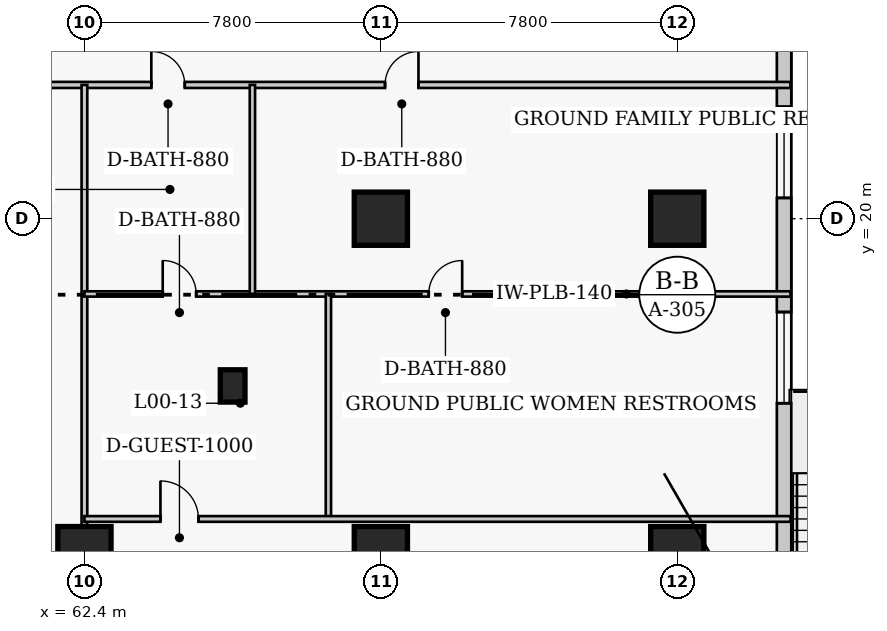
"""IFC4 building model, lengths in metres.
Left out: names, types, materials, properties, quantities, classifications, styles, units other than length and angle.
Written with IfcOpenShell. Run it as: python <this file> out.ifc"""

import sys

from ifc_helpers import new_model, si_unit, direction, frame, frame_2d, origin, origin_2d, place, context, subcontext, project, spatial, rectangle, extrude, element, fill, save


model = new_model("IFC4")
c1 = context("Model", 3, precision=1e-05, world=origin(), true_north=direction((0.0, 1.0)))
c2 = subcontext(c1, "Body", "Model", "MODEL_VIEW")
j1 = project(units=[si_unit("LENGTHUNIT", "METRE"), si_unit("PLANEANGLEUNIT", "RADIAN")], contexts=[c1])
p1 = place(None, origin())
s1 = spatial("IfcSite", under=j1, at=p1, CompositionType="ELEMENT")
p2 = place(p1, origin())
s2 = spatial("IfcBuilding", under=s1, at=p2, CompositionType="ELEMENT")
p3 = place(p2, origin())
s3 = spatial("IfcBuildingStorey", under=s2, at=p3, CompositionType="ELEMENT", Elevation=0.0)
for number, where, z_axis, x_axis in (
    (1, (62.4, 11.2, 0.0), (0.0, 0.0, 1.0), (1.0, 0.0, 0.0)),
    (2, (70.2, 11.2, 0.0), (0.0, 0.0, 1.0), (1.0, 0.0, 0.0)),
    (3, (70.2, 20.0, 0.0), (0.0, 0.0, 1.0), (1.0, 0.0, 0.0)),
    (4, (78.0, 11.2, 0.0), (0.0, 0.0, 1.0), (1.0, 0.0, 0.0)),
    (5, (78.0, 20.0, 0.0), (0.0, 0.0, 1.0), (1.0, 0.0, 0.0)),
):
    element("IfcColumn", number, at=place(p3, frame(where, z_axis=z_axis, x_axis=x_axis)), inside=s3, PredefinedType="COLUMN", context=c2, shape_type="SweptSolid", body=[
        extrude(rectangle(XDim=1.4, YDim=1.4, at=origin_2d()), origin(), (0.0, 0.0, 1.0), 5.4),
    ])
p4 = place(p3, frame((66.3, 15.6, 0.0), z_axis=(0.0, 0.0, 1.0), x_axis=(1.0, 0.0, 0.0)))
e6 = element("IfcColumn", 6, at=p4, inside=s3, PredefinedType="PILASTER", context=c2, shape_type="SweptSolid", body=[
    extrude(rectangle(XDim=0.65, YDim=0.85, at=origin_2d()), origin(), (0.0, 0.0, 1.0), 5.4),
])
p5 = place(p3, frame((80.81, 49.39, 0.0), z_axis=(0.0, 0.0, 1.0), x_axis=(0.0, -1.0, 0.0)))
e7 = element("IfcWall", 7, at=p5, inside=s3, PredefinedType="SOLIDWALL", context=c2, shape_type="SweptSolid", body=[
    extrude(rectangle(XDim=46.78, YDim=0.38, at=frame_2d((23.39, 0.0))), origin(), (0.0, 0.0, 1.0), 5.1),
])
p6 = place(p5, frame((15.29, 0.0, 0.0)))
e8 = element("IfcOpeningElement", 8, at=p6, cuts=e7, PredefinedType="OPENING", context=c2, shape_type="SweptSolid", body=[
    extrude(rectangle(XDim=3.2, YDim=2.6, at=frame_2d((1.6, 1.3))), frame((0.0, 0.2, 0.0), z_axis=(0.0, -1.0, 0.0), x_axis=(1.0, 0.0, 0.0)), (0.0, 0.0, 1.0), 0.4),
])
p7 = place(p5, frame((9.99, 0.0, 0.0)))
e9 = element("IfcOpeningElement", 9, at=p7, cuts=e7, PredefinedType="OPENING", context=c2, shape_type="SweptSolid", body=[
    extrude(rectangle(XDim=3.2, YDim=2.6, at=frame_2d((1.6, 1.3))), frame((0.0, 0.2, 0.0), z_axis=(0.0, -1.0, 0.0), x_axis=(1.0, 0.0, 0.0)), (0.0, 0.0, 1.0), 0.4),
])
p8 = place(p5, frame((4.99, 0.0, 0.0)))
e10 = element("IfcOpeningElement", 10, at=p8, cuts=e7, PredefinedType="OPENING", context=c2, shape_type="SweptSolid", body=[
    extrude(rectangle(XDim=3.2, YDim=2.6, at=frame_2d((1.6, 1.3))), frame((0.0, 0.2, 0.0), z_axis=(0.0, -1.0, 0.0), x_axis=(1.0, 0.0, 0.0)), (0.0, 0.0, 1.0), 0.4),
])
p9 = place(p5, frame((0.79, 0.0, 0.0)))
e11 = element("IfcOpeningElement", 11, at=p9, cuts=e7, PredefinedType="OPENING", context=c2, shape_type="SweptSolid", body=[
    extrude(rectangle(XDim=3.2, YDim=2.6, at=frame_2d((1.6, 1.3))), frame((0.0, 0.2, 0.0), z_axis=(0.0, -1.0, 0.0), x_axis=(1.0, 0.0, 0.0)), (0.0, 0.0, 1.0), 0.4),
])
p10 = place(p5, frame((19.087, 0.0, 0.75)))
e12 = element("IfcOpeningElement", 12, at=p10, cuts=e7, PredefinedType="OPENING", context=c2, shape_type="SweptSolid", body=[
    extrude(rectangle(XDim=2.4, YDim=2.2, at=frame_2d((1.2, 1.1))), frame((0.0, 0.2, 0.0), z_axis=(0.0, -1.0, 0.0), x_axis=(1.0, 0.0, 0.0)), (0.0, 0.0, 1.0), 0.4),
])
p11 = place(p5, frame((26.443, 0.0, 0.75)))
e13 = element("IfcOpeningElement", 13, at=p11, cuts=e7, PredefinedType="OPENING", context=c2, shape_type="SweptSolid", body=[
    extrude(rectangle(XDim=2.4, YDim=2.2, at=frame_2d((1.2, 1.1))), frame((0.0, 0.2, 0.0), z_axis=(0.0, -1.0, 0.0), x_axis=(1.0, 0.0, 0.0)), (0.0, 0.0, 1.0), 0.4),
])
p12 = place(p5, frame((31.845, 0.0, 0.75)))
e14 = element("IfcOpeningElement", 14, at=p12, cuts=e7, PredefinedType="OPENING", context=c2, shape_type="SweptSolid", body=[
    extrude(rectangle(XDim=2.4, YDim=2.2, at=frame_2d((1.2, 1.1))), frame((0.0, 0.2, 0.0), z_axis=(0.0, -1.0, 0.0), x_axis=(1.0, 0.0, 0.0)), (0.0, 0.0, 1.0), 0.4),
])
p13 = place(p5, frame((39.201, 0.0, 0.75)))
e15 = element("IfcOpeningElement", 15, at=p13, cuts=e7, PredefinedType="OPENING", context=c2, shape_type="SweptSolid", body=[
    extrude(rectangle(XDim=2.4, YDim=2.2, at=frame_2d((1.2, 1.1))), frame((0.0, 0.2, 0.0), z_axis=(0.0, -1.0, 0.0), x_axis=(1.0, 0.0, 0.0)), (0.0, 0.0, 1.0), 0.4),
])
p14 = place(p5, frame((43.454, 0.0, 0.75)))
e16 = element("IfcOpeningElement", 16, at=p14, cuts=e7, PredefinedType="OPENING", context=c2, shape_type="SweptSolid", body=[
    extrude(rectangle(XDim=2.4, YDim=2.2, at=frame_2d((1.2, 1.1))), frame((0.0, 0.2, 0.0), z_axis=(0.0, -1.0, 0.0), x_axis=(1.0, 0.0, 0.0)), (0.0, 0.0, 1.0), 0.4),
])
p15 = place(p3, frame((-2.98, 23.52, 0.0), z_axis=(0.0, 0.0, 1.0), x_axis=(1.0, 0.0, 0.0)))
e17 = element("IfcWall", 17, at=p15, inside=s3, PredefinedType="PARTITIONING", context=c2, shape_type="SweptSolid", body=[
    extrude(rectangle(XDim=83.96, YDim=0.16, at=frame_2d((41.98, 0.0))), origin(), (0.0, 0.0, 1.0), 5.1),
])
p16 = place(p15, frame((11.96, 0.0, 0.0)))
e18 = element("IfcOpeningElement", 18, at=p16, cuts=e17, PredefinedType="OPENING", context=c2, shape_type="SweptSolid", body=[
    extrude(rectangle(XDim=1.1, YDim=2.15, at=frame_2d((0.55, 1.075))), frame((0.0, 0.09, 0.0), z_axis=(0.0, -1.0, 0.0), x_axis=(1.0, 0.0, 0.0)), (0.0, 0.0, 1.0), 0.18),
])
p17 = place(p15, frame((6.73, 0.0, 0.0)))
e19 = element("IfcOpeningElement", 19, at=p17, cuts=e17, PredefinedType="OPENING", context=c2, shape_type="SweptSolid", body=[
    extrude(rectangle(XDim=1.8, YDim=2.2, at=frame_2d((0.9, 1.1))), frame((0.0, 0.09, 0.0), z_axis=(0.0, -1.0, 0.0), x_axis=(1.0, 0.0, 0.0)), (0.0, 0.0, 1.0), 0.18),
])
p18 = place(p15, frame((24.38, 0.0, 0.0)))
e20 = element("IfcOpeningElement", 20, at=p18, cuts=e17, PredefinedType="OPENING", context=c2, shape_type="SweptSolid", body=[
    extrude(rectangle(XDim=2.2, YDim=2.4, at=frame_2d((1.1, 1.2))), frame((0.0, 0.09, 0.0), z_axis=(0.0, -1.0, 0.0), x_axis=(1.0, 0.0, 0.0)), (0.0, 0.0, 1.0), 0.18),
])
p19 = place(p15, frame((40.88, 0.0, 0.0)))
e21 = element("IfcOpeningElement", 21, at=p19, cuts=e17, PredefinedType="OPENING", context=c2, shape_type="SweptSolid", body=[
    extrude(rectangle(XDim=2.2, YDim=2.4, at=frame_2d((1.1, 1.2))), frame((0.0, 0.09, 0.0), z_axis=(0.0, -1.0, 0.0), x_axis=(1.0, 0.0, 0.0)), (0.0, 0.0, 1.0), 0.18),
])
p20 = place(p15, frame((56.63, 0.0, 0.0)))
e22 = element("IfcOpeningElement", 22, at=p20, cuts=e17, PredefinedType="OPENING", context=c2, shape_type="SweptSolid", body=[
    extrude(rectangle(XDim=2.2, YDim=2.4, at=frame_2d((1.1, 1.2))), frame((0.0, 0.09, 0.0), z_axis=(0.0, -1.0, 0.0), x_axis=(1.0, 0.0, 0.0)), (0.0, 0.0, 1.0), 0.18),
])
p21 = place(p15, frame((67.14, 0.0, 0.0)))
e23 = element("IfcOpeningElement", 23, at=p21, cuts=e17, PredefinedType="OPENING", context=c2, shape_type="SweptSolid", body=[
    extrude(rectangle(XDim=0.88, YDim=2.05, at=frame_2d((0.44, 1.025))), frame((0.0, 0.09, 0.0), z_axis=(0.0, -1.0, 0.0), x_axis=(1.0, 0.0, 0.0)), (0.0, 0.0, 1.0), 0.18),
])
p22 = place(p15, frame((73.29, 0.0, 0.0)))
e24 = element("IfcOpeningElement", 24, at=p22, cuts=e17, PredefinedType="OPENING", context=c2, shape_type="SweptSolid", body=[
    extrude(rectangle(XDim=0.88, YDim=2.05, at=frame_2d((0.44, 1.025))), frame((0.0, 0.09, 0.0), z_axis=(0.0, -1.0, 0.0), x_axis=(1.0, 0.0, 0.0)), (0.0, 0.0, 1.0), 0.18),
])
p23 = place(p3, frame((62.4, 0.42, 0.0), z_axis=(0.0, 0.0, 1.0), x_axis=(0.0, 1.0, 0.0)))
e25 = element("IfcWall", 25, at=p23, inside=s3, PredefinedType="PARTITIONING", context=c2, shape_type="SweptSolid", body=[
    extrude(rectangle(XDim=23.1, YDim=0.15, at=frame_2d((11.55, 0.0))), origin(), (0.0, 0.0, 1.0), 4.35),
])
p24 = place(p3, frame((62.4, 18.02, 0.0), z_axis=(0.0, 0.0, 1.0), x_axis=(1.0, 0.0, 0.0)))
e26 = element("IfcWall", 26, at=p24, inside=s3, PredefinedType="PLUMBINGWALL", context=c2, shape_type="SweptSolid", body=[
    extrude(rectangle(XDim=18.58, YDim=0.14, at=frame_2d((9.29, 0.0))), origin(), (0.0, 0.0, 1.0), 5.1),
])
p25 = place(p24, frame((2.06, 0.0, 0.0)))
e27 = element("IfcOpeningElement", 27, at=p25, cuts=e26, PredefinedType="OPENING", context=c2, shape_type="SweptSolid", body=[
    extrude(rectangle(XDim=0.88, YDim=2.05, at=frame_2d((0.44, 1.025))), frame((0.0, 0.08, 0.0), z_axis=(0.0, -1.0, 0.0), x_axis=(1.0, 0.0, 0.0)), (0.0, 0.0, 1.0), 0.16),
])
p26 = place(p24, frame((9.06, 0.0, 0.0)))
e28 = element("IfcOpeningElement", 28, at=p26, cuts=e26, PredefinedType="OPENING", context=c2, shape_type="SweptSolid", body=[
    extrude(rectangle(XDim=0.88, YDim=2.05, at=frame_2d((0.44, 1.025))), frame((0.0, 0.08, 0.0), z_axis=(0.0, -1.0, 0.0), x_axis=(1.0, 0.0, 0.0)), (0.0, 0.0, 1.0), 0.16),
])
p27 = place(p3, frame((66.82, 18.02, 0.0), z_axis=(0.0, 0.0, 1.0), x_axis=(0.0, 1.0, 0.0)))
e29 = element("IfcWall", 29, at=p27, inside=s3, PredefinedType="PLUMBINGWALL", context=c2, shape_type="SweptSolid", body=[
    extrude(rectangle(XDim=5.5, YDim=0.14, at=frame_2d((2.75, 0.0))), origin(), (0.0, 0.0, 1.0), 5.1),
])
p28 = place(p3, frame((68.82, 12.1, 0.0), z_axis=(0.0, 0.0, 1.0), x_axis=(0.0, 1.0, 0.0)))
e30 = element("IfcWall", 30, at=p28, inside=s3, PredefinedType="PLUMBINGWALL", context=c2, shape_type="SweptSolid", body=[
    extrude(rectangle(XDim=5.92, YDim=0.14, at=frame_2d((2.96, 0.0))), origin(), (0.0, 0.0, 1.0), 5.1),
])
p29 = place(p3, frame((62.4, 12.1, 0.0), z_axis=(0.0, 0.0, 1.0), x_axis=(1.0, 0.0, 0.0)))
e31 = element("IfcWall", 31, at=p29, inside=s3, PredefinedType="PARTITIONING", context=c2, shape_type="SweptSolid", body=[
    extrude(rectangle(XDim=18.58, YDim=0.15, at=frame_2d((9.29, 0.0))), origin(), (0.0, 0.0, 1.0), 5.1),
])
p30 = place(p29, frame((2.0, 0.0, 0.0)))
e32 = element("IfcOpeningElement", 32, at=p30, cuts=e31, PredefinedType="OPENING", context=c2, shape_type="SweptSolid", body=[
    extrude(rectangle(XDim=1.0, YDim=2.15, at=frame_2d((0.5, 1.075))), frame((0.0, 0.085, 0.0), z_axis=(0.0, -1.0, 0.0), x_axis=(1.0, 0.0, 0.0)), (0.0, 0.0, 1.0), 0.17),
])
p31 = place(p11, origin())
e33 = element("IfcWindow", 33, at=p31, inside=s3, PartitioningType="SINGLE_PANEL", PredefinedType="WINDOW", context=c2, shape_type="SweptSolid", body=[
    extrude(rectangle(XDim=2.4, YDim=2.2, at=frame_2d((1.2, 1.1))), frame((0.0, 0.03, 0.0), z_axis=(0.0, -1.0, 0.0), x_axis=(1.0, 0.0, 0.0)), (0.0, 0.0, 1.0), 0.06),
])
fill(e13, e33)
p32 = place(p12, origin())
e34 = element("IfcWindow", 34, at=p32, inside=s3, PartitioningType="SINGLE_PANEL", PredefinedType="WINDOW", context=c2, shape_type="SweptSolid", body=[
    extrude(rectangle(XDim=2.4, YDim=2.2, at=frame_2d((1.2, 1.1))), frame((0.0, 0.03, 0.0), z_axis=(0.0, -1.0, 0.0), x_axis=(1.0, 0.0, 0.0)), (0.0, 0.0, 1.0), 0.06),
])
fill(e14, e34)
p33 = place(p21, origin())
e35 = element("IfcDoor", 35, at=p33, inside=s3, OperationType="SINGLE_SWING_LEFT", PredefinedType="DOOR", context=c2, shape_type="SweptSolid", body=[
    extrude(rectangle(XDim=0.88, YDim=2.05, at=frame_2d((0.44, 1.025))), frame((0.0, 0.025, 0.0), z_axis=(0.0, -1.0, 0.0), x_axis=(1.0, 0.0, 0.0)), (0.0, 0.0, 1.0), 0.05),
])
fill(e23, e35)
p34 = place(p22, origin())
e36 = element("IfcDoor", 36, at=p34, inside=s3, OperationType="SINGLE_SWING_RIGHT", PredefinedType="DOOR", context=c2, shape_type="SweptSolid", body=[
    extrude(rectangle(XDim=0.88, YDim=2.05, at=frame_2d((0.44, 1.025))), frame((0.0, 0.025, 0.0), z_axis=(0.0, -1.0, 0.0), x_axis=(1.0, 0.0, 0.0)), (0.0, 0.0, 1.0), 0.05),
])
fill(e24, e36)
p35 = place(p25, origin())
e37 = element("IfcDoor", 37, at=p35, inside=s3, OperationType="SINGLE_SWING_LEFT", PredefinedType="DOOR", context=c2, shape_type="SweptSolid", body=[
    extrude(rectangle(XDim=0.88, YDim=2.05, at=frame_2d((0.44, 1.025))), frame((0.0, 0.025, 0.0), z_axis=(0.0, -1.0, 0.0), x_axis=(1.0, 0.0, 0.0)), (0.0, 0.0, 1.0), 0.05),
])
fill(e27, e37)
p36 = place(p26, origin())
e38 = element("IfcDoor", 38, at=p36, inside=s3, OperationType="SINGLE_SWING_RIGHT", PredefinedType="DOOR", context=c2, shape_type="SweptSolid", body=[
    extrude(rectangle(XDim=0.88, YDim=2.05, at=frame_2d((0.44, 1.025))), frame((0.0, 0.025, 0.0), z_axis=(0.0, -1.0, 0.0), x_axis=(1.0, 0.0, 0.0)), (0.0, 0.0, 1.0), 0.05),
])
fill(e28, e38)
p37 = place(p30, origin())
e39 = element("IfcDoor", 39, at=p37, inside=s3, OperationType="SINGLE_SWING_LEFT", PredefinedType="DOOR", context=c2, shape_type="SweptSolid", body=[
    extrude(rectangle(XDim=1.0, YDim=2.15, at=frame_2d((0.5, 1.075))), frame((0.0, 0.025, 0.0), z_axis=(0.0, -1.0, 0.0), x_axis=(1.0, 0.0, 0.0)), (0.0, 0.0, 1.0), 0.05),
])
fill(e32, e39)
save(model, sys.argv[1])
